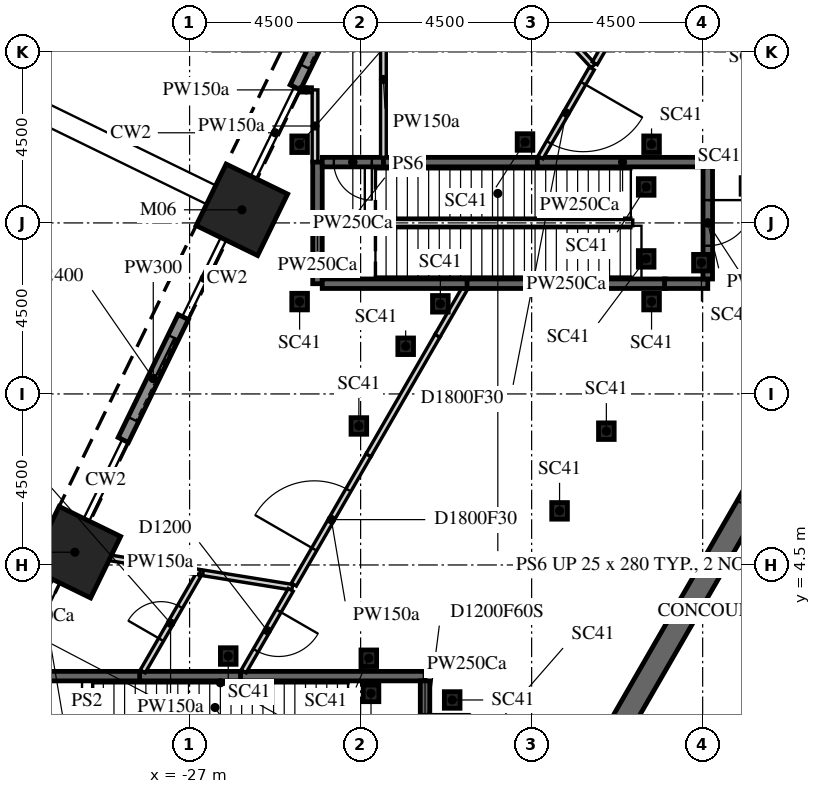
"""IFC4 building model, lengths in metres.
Left out: names, types, materials, properties, quantities, classifications, styles, units other than length and angle.
Written with IfcOpenShell. Run it as: python <this file> out.ifc"""

import sys

from ifc_helpers import new_model, si_unit, direction, frame, frame_2d, origin, origin_2d, place, context, subcontext, project, spatial, polyline, rectangle, i_section, outline, extrude, element, fill, save


model = new_model("IFC4")
c1 = context("Model", 3, precision=1e-05, world=origin(), true_north=direction((0.0, 1.0)))
c2 = subcontext(c1, "Body", "Model", "MODEL_VIEW")
j1 = project(units=[si_unit("LENGTHUNIT", "METRE"), si_unit("PLANEANGLEUNIT", "RADIAN")], contexts=[c1])
p1 = place(None, origin())
s1 = spatial("IfcSite", under=j1, at=p1, CompositionType="ELEMENT")
p2 = place(p1, origin())
s2 = spatial("IfcBuilding", under=s1, at=p2, CompositionType="ELEMENT")
p3 = place(p2, origin())
s3 = spatial("IfcBuildingStorey", under=s2, at=p3, CompositionType="ELEMENT", Elevation=0.0)
for number, where, z_axis, x_axis in (
    (1, (-25.624, 13.845, -2.1), (0.0, 0.0, 1.0), (0.438, 0.899, 0.0)),
    (2, (-30.018, 4.836, -2.1), (0.0, 0.0, 1.0), (0.438, 0.899, 0.0)),
):
    element("IfcColumn", number, at=place(p3, frame(where, z_axis=z_axis, x_axis=x_axis)), inside=s3, PredefinedType="COLUMN", context=c2, shape_type="SweptSolid", body=[
        extrude(rectangle(XDim=1.8, YDim=1.8, at=origin_2d()), origin(), (0.0, 0.0, 1.0), 10.85),
    ])
for number, where, z_axis, x_axis in (
    (3, (-25.983, 2.104, -2.1), (0.0, 0.0, 1.0), (1.0, 0.0, 0.0)),
    (4, (-22.546, 8.157, -2.1), (0.0, 0.0, 1.0), (1.0, 0.0, 0.0)),
    (5, (-17.265, 5.924, -2.1), (0.0, 0.0, 1.0), (1.0, 0.0, 0.0)),
    (6, (-20.091, 0.948, -2.1), (0.0, 0.0, 1.0), (1.0, 0.0, 0.0)),
    (7, (-22.226, 1.121, -2.1), (0.0, 0.0, 1.0), (1.0, 0.0, 0.0)),
    (8, (-16.034, 8.021, -2.1), (0.0, 0.0, 1.0), (1.0, 0.0, 0.0)),
    (9, (-21.314, 10.254, -2.1), (0.0, 0.0, 1.0), (1.0, 0.0, 0.0)),
    (10, (-20.402, 11.371, -2.1), (0.0, 0.0, 1.0), (1.0, 0.0, 0.0)),
    (11, (-24.105, 11.43, -2.1), (0.0, 0.0, 1.0), (1.0, 0.0, 0.0)),
    (12, (-24.105, 15.57, -2.1), (0.0, 0.0, 1.0), (1.0, 0.0, 0.0)),
    (13, (-18.174, 15.629, -2.1), (0.0, 0.0, 1.0), (1.0, 0.0, 0.0)),
    (14, (-14.986, 14.446, -2.1), (0.0, 0.0, 1.0), (1.0, 0.0, 0.0)),
    (15, (-14.986, 12.554, -2.1), (0.0, 0.0, 1.0), (1.0, 0.0, 0.0)),
    (16, (-13.532, 12.454, -2.1), (0.0, 0.0, 1.0), (1.0, 0.0, 0.0)),
    (17, (-22.285, 2.045, -2.1), (0.0, 0.0, 1.0), (1.0, 0.0, 0.0)),
    (18, (-14.845, 15.57, -2.1), (0.0, 0.0, 1.0), (1.0, 0.0, 0.0)),
    (19, (-14.845, 11.43, -2.1), (0.0, 0.0, 1.0), (1.0, 0.0, 0.0)),
):
    element("IfcColumn", number, at=place(p3, frame(where, z_axis=z_axis, x_axis=x_axis)), inside=s3, PredefinedType="COLUMN", context=c2, shape_type="SweptSolid", body=[
        extrude(i_section(OverallWidth=0.412, OverallDepth=0.437, WebThickness=0.036, FlangeThickness=0.058, FilletRadius=0.015, at=origin_2d()), origin(), (0.0, 0.0, 1.0), 10.85),
    ])
p4 = place(p3, frame((-22.904, 19.764, 0.0), z_axis=(0.0, 0.0, 1.0), x_axis=(-0.43833704405, -0.898810678516, 0.0)))
e20 = element("IfcWall", 20, at=p4, inside=s3, PredefinedType="SOLIDWALL", context=c2, shape_type="SweptSolid", body=[
    extrude(rectangle(XDim=3.0, YDim=0.3, at=frame_2d((1.5, 0.0))), origin(), (0.0, 0.0, 1.0), 7.823),
])
p5 = place(p4, frame((0.6, 0.0, 0.0)))
e21 = element("IfcOpeningElement", 21, at=p5, cuts=e20, PredefinedType="OPENING", context=c2, shape_type="SweptSolid", body=[
    extrude(rectangle(XDim=1.8, YDim=2.4, at=frame_2d((0.9, 1.2))), frame((0.0, 0.16, 0.0), z_axis=(0.0, -1.0, 0.0), x_axis=(1.0, 0.0, 0.0)), (0.0, 0.0, 1.0), 0.32),
])
p6 = place(p3, frame((-27.167, 11.024, 0.0), z_axis=(0.0, 0.0, 1.0), x_axis=(-0.438348810402, -0.89880494014, 0.0)))
e22 = element("IfcWall", 22, at=p6, inside=s3, PredefinedType="SOLIDWALL", context=c2, shape_type="SweptSolid", body=[
    extrude(rectangle(XDim=3.6, YDim=0.3, at=frame_2d((1.8, 0.0))), origin(), (0.0, 0.0, 1.0), 7.823),
])
p7 = place(p6, frame((0.6, 0.0, 0.0)))
e23 = element("IfcOpeningElement", 23, at=p7, cuts=e22, PredefinedType="OPENING", context=c2, shape_type="SweptSolid", body=[
    extrude(rectangle(XDim=2.4, YDim=3.0, at=frame_2d((1.2, 1.5))), frame((0.0, 0.16, 0.0), z_axis=(0.0, -1.0, 0.0), x_axis=(1.0, 0.0, 0.0)), (0.0, 0.0, 1.0), 0.32),
])
p8 = place(p3, frame((-7.91, 13.7, -2.1), z_axis=(0.0, 0.0, 1.0), x_axis=(-0.499999880136, -0.866025472988, 0.0)))
e24 = element("IfcWall", 24, at=p8, inside=s3, PredefinedType="SHEAR", context=c2, shape_type="SweptSolid", body=[
    extrude(outline(polyline([(-0.173, -0.3), (15.993, -0.3), (15.646, 0.3), (0.173, 0.3), (-0.173, -0.3)])), origin(), (0.0, 0.0, 1.0), 10.85),
])
p9 = place(p8, frame((7.039, 0.0, 2.1)))
e25 = element("IfcOpeningElement", 25, at=p9, cuts=e24, PredefinedType="OPENING", context=c2, shape_type="SweptSolid", body=[
    extrude(rectangle(XDim=1.8, YDim=2.4, at=frame_2d((0.9, 1.2))), frame((0.0, 0.31, 0.0), z_axis=(0.0, -1.0, 0.0), x_axis=(1.0, 0.0, 0.0)), (0.0, 0.0, 1.0), 0.62),
])
p10 = place(p3, frame((-30.95, 1.575, 0.0), z_axis=(0.0, 0.0, 1.0), x_axis=(1.0, 0.0, 0.0)))
e26 = element("IfcWall", 26, at=p10, inside=s3, PredefinedType="PARTITIONING", context=c2, shape_type="SweptSolid", body=[
    extrude(rectangle(XDim=2.657, YDim=0.25, at=frame_2d((1.329, 0.0))), origin(), (0.0, 0.0, 1.0), 8.75),
])
p11 = place(p3, frame((-30.018, 4.836, 0.0), z_axis=(0.0, 0.0, 1.0), x_axis=(0.987270453079, -0.159050471478, 0.0)))
e27 = element("IfcWall", 27, at=p11, inside=s3, PredefinedType="PARTITIONING", context=c2, shape_type="SweptSolid", body=[
    extrude(rectangle(XDim=3.333, YDim=0.15, at=frame_2d((1.666, 0.0))), origin(), (0.0, 0.0, 1.0), 8.75),
])
p12 = place(p3, frame((-28.315, 1.575, 0.0), z_axis=(0.0, 0.0, 1.0), x_axis=(1.0, 0.0, 0.0)))
e28 = element("IfcWall", 28, at=p12, inside=s3, PredefinedType="PARTITIONING", context=c2, shape_type="SweptSolid", body=[
    extrude(rectangle(XDim=2.678, YDim=0.25, at=frame_2d((1.339, 0.0))), origin(), (0.0, 0.0, 1.0), 8.75),
])
p13 = place(p3, frame((-28.233, 1.7, 0.0), z_axis=(0.0, 0.0, 1.0), x_axis=(0.500083180475, 0.865977374189, 0.0)))
e29 = element("IfcWall", 29, at=p13, inside=s3, PredefinedType="PARTITIONING", context=c2, shape_type="SweptSolid", body=[
    extrude(rectangle(XDim=2.929, YDim=0.15, at=frame_2d((1.465, 0.0))), origin(), (0.0, 0.0, 1.0), 8.75),
])
p14 = place(p13, frame((0.965, 0.0, 0.0)))
e30 = element("IfcOpeningElement", 30, at=p14, cuts=e29, PredefinedType="OPENING", context=c2, shape_type="SweptSolid", body=[
    extrude(rectangle(XDim=1.0, YDim=2.1, at=frame_2d((0.5, 1.05))), frame((0.0, 0.085, 0.0), z_axis=(0.0, -1.0, 0.0), x_axis=(1.0, 0.0, 0.0)), (0.0, 0.0, 1.0), 0.17),
])
p15 = place(p3, frame((-26.649, 4.293, 0.0), z_axis=(0.0, 0.0, 1.0), x_axis=(0.987239560751, -0.159242110287, 0.0)))
e31 = element("IfcWall", 31, at=p15, inside=s3, PredefinedType="PARTITIONING", context=c2, shape_type="SweptSolid", body=[
    extrude(rectangle(XDim=2.381, YDim=0.15, at=frame_2d((1.19, 0.0))), origin(), (0.0, 0.0, 1.0), 8.75),
])
p16 = place(p3, frame((-25.659, 1.575, 0.0), z_axis=(0.0, 0.0, 1.0), x_axis=(1.0, 0.0, 0.0)))
e32 = element("IfcWall", 32, at=p16, inside=s3, PredefinedType="PARTITIONING", context=c2, shape_type="SweptSolid", body=[
    extrude(rectangle(XDim=4.854, YDim=0.25, at=frame_2d((2.427, 0.0))), origin(), (0.0, 0.0, 1.0), 8.75),
])
p17 = place(p3, frame((-24.338, 3.844, 0.0), z_axis=(0.0, 0.0, 1.0), x_axis=(-0.500188907164, -0.865916310708, 0.0)))
e33 = element("IfcWall", 33, at=p17, inside=s3, PredefinedType="PARTITIONING", context=c2, shape_type="SweptSolid", body=[
    extrude(rectangle(XDim=2.477, YDim=0.15, at=frame_2d((1.238, 0.0))), origin(), (0.0, 0.0, 1.0), 8.75),
])
p18 = place(p17, frame((0.638, 0.0, 0.0)))
e34 = element("IfcOpeningElement", 34, at=p18, cuts=e33, PredefinedType="OPENING", context=c2, shape_type="SweptSolid", body=[
    extrude(rectangle(XDim=1.2, YDim=2.1, at=frame_2d((0.6, 1.05))), frame((0.0, 0.085, 0.0), z_axis=(0.0, -1.0, 0.0), x_axis=(1.0, 0.0, 0.0)), (0.0, 0.0, 1.0), 0.17),
])
p19 = place(p3, frame((-23.7, 15.1, 0.0), z_axis=(0.0, 0.0, 1.0), x_axis=(0.0, 1.0, 0.0)))
e35 = element("IfcWall", 35, at=p19, inside=s3, PredefinedType="PARTITIONING", context=c2, shape_type="SweptSolid", body=[
    extrude(rectangle(XDim=1.9, YDim=0.15, at=frame_2d((0.95, 0.0))), origin(), (0.0, 0.0, 1.0), 8.75),
])
p20 = place(p3, frame((-23.775, 17.0, 0.0), z_axis=(0.0, 0.0, 1.0), x_axis=(-1.0, 0.0, 0.0)))
e36 = element("IfcWall", 36, at=p20, inside=s3, PredefinedType="PARTITIONING", context=c2, shape_type="SweptSolid", body=[
    extrude(rectangle(XDim=0.31, YDim=0.15, at=frame_2d((0.155, 0.0))), origin(), (0.0, 0.0, 1.0), 8.75),
])
p21 = place(p3, frame((-23.635, 11.9, 0.0), z_axis=(0.0, 0.0, 1.0), x_axis=(0.0, 1.0, 0.0)))
e37 = element("IfcWall", 37, at=p21, inside=s3, PredefinedType="PARTITIONING", context=c2, shape_type="SweptSolid", body=[
    extrude(rectangle(XDim=3.2, YDim=0.25, at=frame_2d((1.6, 0.0))), origin(), (0.0, 0.0, 1.0), 8.75),
])
p22 = place(p3, frame((-24.258, 3.983, 0.0), z_axis=(0.0, 0.0, 1.0), x_axis=(0.500095273167, 0.865970390808, 0.0)))
e38 = element("IfcWall", 38, at=p22, inside=s3, PredefinedType="PARTITIONING", context=c2, shape_type="SweptSolid", body=[
    extrude(rectangle(XDim=3.949, YDim=0.15, at=frame_2d((1.975, 0.0))), origin(), (0.0, 0.0, 1.0), 8.75),
])
p23 = place(p22, frame((1.074, 0.0, 0.0)))
e39 = element("IfcOpeningElement", 39, at=p23, cuts=e38, PredefinedType="OPENING", context=c2, shape_type="SweptSolid", body=[
    extrude(rectangle(XDim=1.8, YDim=2.1, at=frame_2d((0.9, 1.05))), frame((0.0, 0.085, 0.0), z_axis=(0.0, -1.0, 0.0), x_axis=(1.0, 0.0, 0.0)), (0.0, 0.0, 1.0), 0.17),
])
p24 = place(p3, frame((-21.91, 15.1, 0.0), z_axis=(0.0, 0.0, 1.0), x_axis=(1.0, 0.0, 0.0)))
e40 = element("IfcWall", 40, at=p24, inside=s3, PredefinedType="PARTITIONING", context=c2, shape_type="SweptSolid", body=[
    extrude(rectangle(XDim=4.082, YDim=0.25, at=frame_2d((2.041, 0.0))), origin(), (0.0, 0.0, 1.0), 8.75),
])
p25 = place(p3, frame((-21.9, 15.1, 0.0), z_axis=(0.0, 0.0, 1.0), x_axis=(-1.0, 0.0, 0.0)))
e41 = element("IfcWall", 41, at=p25, inside=s3, PredefinedType="PARTITIONING", context=c2, shape_type="SweptSolid", body=[
    extrude(rectangle(XDim=1.61, YDim=0.25, at=frame_2d((0.805, 0.0))), origin(), (0.0, 0.0, 1.0), 8.75),
])
p26 = place(p25, frame((0.305, 0.0, 0.0)))
e42 = element("IfcOpeningElement", 42, at=p26, cuts=e41, PredefinedType="OPENING", context=c2, shape_type="SweptSolid", body=[
    extrude(rectangle(XDim=1.0, YDim=2.1, at=frame_2d((0.5, 1.05))), frame((0.0, 0.135, 0.0), z_axis=(0.0, -1.0, 0.0), x_axis=(1.0, 0.0, 0.0)), (0.0, 0.0, 1.0), 0.27),
])
p27 = place(p3, frame((-21.9, 19.325, 0.0), z_axis=(0.0, 0.0, 1.0), x_axis=(0.0, -1.0, 0.0)))
e43 = element("IfcWall", 43, at=p27, inside=s3, PredefinedType="PARTITIONING", context=c2, shape_type="SweptSolid", body=[
    extrude(rectangle(XDim=4.1, YDim=0.15, at=frame_2d((2.05, 0.0))), origin(), (0.0, 0.0, 1.0), 8.75),
])
p28 = place(p3, frame((-21.23, 22.854, 0.0), z_axis=(0.0, 0.0, 1.0), x_axis=(0.68068621698, -0.732575097866, 0.0)))
e44 = element("IfcWall", 44, at=p28, inside=s3, PredefinedType="PARTITIONING", context=c2, shape_type="SweptSolid", body=[
    extrude(rectangle(XDim=7.128, YDim=0.15, at=frame_2d((3.564, 0.0))), origin(), (0.0, 0.0, 1.0), 8.75),
])
p29 = place(p3, frame((-20.805, 1.45, 0.0), z_axis=(0.0, 0.0, 1.0), x_axis=(0.0, -1.0, 0.0)))
e45 = element("IfcWall", 45, at=p29, inside=s3, PredefinedType="PARTITIONING", context=c2, shape_type="SweptSolid", body=[
    extrude(rectangle(XDim=2.95, YDim=0.25, at=frame_2d((1.475, 0.0))), origin(), (0.0, 0.0, 1.0), 8.75),
])
p30 = place(p29, frame((0.875, 0.0, 0.0)))
e46 = element("IfcOpeningElement", 46, at=p30, cuts=e45, PredefinedType="OPENING", context=c2, shape_type="SweptSolid", body=[
    extrude(rectangle(XDim=1.2, YDim=2.1, at=frame_2d((0.6, 1.05))), frame((0.0, 0.135, 0.0), z_axis=(0.0, -1.0, 0.0), x_axis=(1.0, 0.0, 0.0)), (0.0, 0.0, 1.0), 0.27),
])
p31 = place(p3, frame((-20.469, 10.546, 0.0), z_axis=(0.0, 0.0, 1.0), x_axis=(-0.499917465472, -0.866073049873, 0.0)))
e47 = element("IfcWall", 47, at=p31, inside=s3, PredefinedType="PARTITIONING", context=c2, shape_type="SweptSolid", body=[
    extrude(rectangle(XDim=3.648, YDim=0.15, at=frame_2d((1.824, 0.0))), origin(), (0.0, 0.0, 1.0), 8.75),
])
p32 = place(p3, frame((-19.759, 11.775, 0.0), z_axis=(0.0, 0.0, 1.0), x_axis=(-0.499932865626, -0.866064160364, 0.0)))
e48 = element("IfcWall", 48, at=p32, inside=s3, PredefinedType="PARTITIONING", context=c2, shape_type="SweptSolid", body=[
    extrude(rectangle(XDim=1.44, YDim=0.15, at=frame_2d((0.72, 0.0))), origin(), (0.0, 0.0, 1.0), 8.75),
])
p33 = place(p3, frame((-19.677, 11.9, 0.0), z_axis=(0.0, 0.0, 1.0), x_axis=(-1.0, 0.0, 0.0)))
e49 = element("IfcWall", 49, at=p33, inside=s3, PredefinedType="PARTITIONING", context=c2, shape_type="SweptSolid", body=[
    extrude(rectangle(XDim=3.833, YDim=0.25, at=frame_2d((1.917, 0.0))), origin(), (0.0, 0.0, 1.0), 8.75),
])
p34 = place(p3, frame((-17.85, 15.1, 0.0), z_axis=(0.0, 0.0, 1.0), x_axis=(1.0, 0.0, 0.0)))
e50 = element("IfcWall", 50, at=p34, inside=s3, PredefinedType="PARTITIONING", context=c2, shape_type="SweptSolid", body=[
    extrude(rectangle(XDim=4.485, YDim=0.25, at=frame_2d((2.243, 0.0))), origin(), (0.0, 0.0, 1.0), 8.75),
])
p35 = place(p3, frame((-16.417, 17.564, 0.0), z_axis=(0.0, 0.0, 1.0), x_axis=(-0.500066738792, -0.865986868696, 0.0)))
e51 = element("IfcWall", 51, at=p35, inside=s3, PredefinedType="PARTITIONING", context=c2, shape_type="SweptSolid", body=[
    extrude(rectangle(XDim=2.701, YDim=0.15, at=frame_2d((1.351, 0.0))), origin(), (0.0, 0.0, 1.0), 8.75),
])
p36 = place(p35, frame((0.45, 0.0, 0.0)))
e52 = element("IfcOpeningElement", 52, at=p36, cuts=e51, PredefinedType="OPENING", context=c2, shape_type="SweptSolid", body=[
    extrude(rectangle(XDim=1.8, YDim=2.1, at=frame_2d((0.9, 1.05))), frame((0.0, 0.085, 0.0), z_axis=(0.0, -1.0, 0.0), x_axis=(1.0, 0.0, 0.0)), (0.0, 0.0, 1.0), 0.17),
])
p37 = place(p3, frame((-16.339, 17.7, 0.0), z_axis=(0.0, 0.0, 1.0), x_axis=(0.500370112486, 0.865811613765, 0.0)))
e53 = element("IfcWall", 53, at=p37, inside=s3, PredefinedType="PARTITIONING", context=c2, shape_type="SweptSolid", body=[
    extrude(rectangle(XDim=2.066, YDim=0.15, at=frame_2d((1.033, 0.0))), origin(), (0.0, 0.0, 1.0), 8.75),
])
p38 = place(p37, frame((0.533, 0.0, 0.0)))
e54 = element("IfcOpeningElement", 54, at=p38, cuts=e53, PredefinedType="OPENING", context=c2, shape_type="SweptSolid", body=[
    extrude(rectangle(XDim=1.0, YDim=2.1, at=frame_2d((0.5, 1.05))), frame((0.0, 0.085, 0.0), z_axis=(0.0, -1.0, 0.0), x_axis=(1.0, 0.0, 0.0)), (0.0, 0.0, 1.0), 0.17),
])
p39 = place(p3, frame((-14.481, 11.9, 0.0), z_axis=(0.0, 0.0, 1.0), x_axis=(-1.0, 0.0, 0.0)))
e55 = element("IfcWall", 55, at=p39, inside=s3, PredefinedType="PARTITIONING", context=c2, shape_type="SweptSolid", body=[
    extrude(rectangle(XDim=5.219, YDim=0.25, at=frame_2d((2.609, 0.0))), origin(), (0.0, 0.0, 1.0), 8.75),
])
p40 = place(p3, frame((-13.365, 11.9, 0.0), z_axis=(0.0, 0.0, 1.0), x_axis=(-1.0, 0.0, 0.0)))
e56 = element("IfcWall", 56, at=p40, inside=s3, PredefinedType="PARTITIONING", context=c2, shape_type="SweptSolid", body=[
    extrude(rectangle(XDim=1.138, YDim=0.25, at=frame_2d((0.569, 0.0))), origin(), (0.0, 0.0, 1.0), 8.75),
])
p41 = place(p3, frame((-13.365, 14.975, 0.0), z_axis=(0.0, 0.0, 1.0), x_axis=(0.0, -1.0, 0.0)))
e57 = element("IfcWall", 57, at=p41, inside=s3, PredefinedType="PARTITIONING", context=c2, shape_type="SweptSolid", body=[
    extrude(rectangle(XDim=2.95, YDim=0.25, at=frame_2d((1.475, 0.0))), origin(), (0.0, 0.0, 1.0), 8.297),
])
p42 = place(p41, frame((0.875, 0.0, 0.0)))
e58 = element("IfcOpeningElement", 58, at=p42, cuts=e57, PredefinedType="OPENING", context=c2, shape_type="SweptSolid", body=[
    extrude(rectangle(XDim=1.2, YDim=2.1, at=frame_2d((0.6, 1.05))), frame((0.0, 0.135, 0.0), z_axis=(0.0, -1.0, 0.0), x_axis=(1.0, 0.0, 0.0)), (0.0, 0.0, 1.0), 0.27),
])
p43 = place(p5, frame((0.0, -0.025, 0.0)))
e59 = element("IfcDoor", 59, at=p43, inside=s3, OperationType="DOUBLE_DOOR_SLIDING", PredefinedType="DOOR", context=c2, shape_type="SweptSolid", body=[
    extrude(rectangle(XDim=1.8, YDim=2.4, at=frame_2d((0.9, 1.2))), frame((0.0, 0.025, 0.0), z_axis=(0.0, -1.0, 0.0), x_axis=(1.0, 0.0, 0.0)), (0.0, 0.0, 1.0), 0.05),
])
fill(e21, e59)
p44 = place(p7, frame((0.0, -0.025, 0.0)))
e60 = element("IfcDoor", 60, at=p44, inside=s3, OperationType="DOUBLE_DOOR_SLIDING", PredefinedType="DOOR", context=c2, shape_type="SweptSolid", body=[
    extrude(rectangle(XDim=2.4, YDim=3.0, at=frame_2d((1.2, 1.5))), frame((0.0, 0.025, 0.0), z_axis=(0.0, -1.0, 0.0), x_axis=(1.0, 0.0, 0.0)), (0.0, 0.0, 1.0), 0.05),
])
fill(e23, e60)
p45 = place(p14, origin())
e61 = element("IfcDoor", 61, at=p45, inside=s3, OperationType="SINGLE_SWING_RIGHT", PredefinedType="DOOR", context=c2, shape_type="SweptSolid", body=[
    extrude(rectangle(XDim=1.0, YDim=2.1, at=frame_2d((0.5, 1.05))), frame((0.0, 0.025, 0.0), z_axis=(0.0, -1.0, 0.0), x_axis=(1.0, 0.0, 0.0)), (0.0, 0.0, 1.0), 0.05),
])
fill(e30, e61)
p46 = place(p18, origin())
e62 = element("IfcDoor", 62, at=p46, inside=s3, OperationType="SINGLE_SWING_RIGHT", PredefinedType="DOOR", context=c2, shape_type="SweptSolid", body=[
    extrude(rectangle(XDim=1.2, YDim=2.1, at=frame_2d((0.6, 1.05))), frame((0.0, 0.025, 0.0), z_axis=(0.0, -1.0, 0.0), x_axis=(1.0, 0.0, 0.0)), (0.0, 0.0, 1.0), 0.05),
])
fill(e34, e62)
p47 = place(p23, origin())
e63 = element("IfcDoor", 63, at=p47, inside=s3, OperationType="DOUBLE_DOOR_SINGLE_SWING", PredefinedType="DOOR", context=c2, shape_type="SweptSolid", body=[
    extrude(rectangle(XDim=1.8, YDim=2.1, at=frame_2d((0.9, 1.05))), frame((0.0, 0.025, 0.0), z_axis=(0.0, -1.0, 0.0), x_axis=(1.0, 0.0, 0.0)), (0.0, 0.0, 1.0), 0.05),
])
fill(e39, e63)
p48 = place(p26, origin())
e64 = element("IfcDoor", 64, at=p48, inside=s3, OperationType="SINGLE_SWING_RIGHT", PredefinedType="DOOR", context=c2, shape_type="SweptSolid", body=[
    extrude(rectangle(XDim=1.0, YDim=2.1, at=frame_2d((0.5, 1.05))), frame((0.0, 0.025, 0.0), z_axis=(0.0, -1.0, 0.0), x_axis=(1.0, 0.0, 0.0)), (0.0, 0.0, 1.0), 0.05),
])
fill(e42, e64)
p49 = place(p36, origin())
e65 = element("IfcDoor", 65, at=p49, inside=s3, OperationType="DOUBLE_DOOR_SINGLE_SWING", PredefinedType="DOOR", context=c2, shape_type="SweptSolid", body=[
    extrude(rectangle(XDim=1.8, YDim=2.1, at=frame_2d((0.9, 1.05))), frame((0.0, 0.025, 0.0), z_axis=(0.0, -1.0, 0.0), x_axis=(1.0, 0.0, 0.0)), (0.0, 0.0, 1.0), 0.05),
])
fill(e52, e65)
p50 = place(p42, origin())
e66 = element("IfcDoor", 66, at=p50, inside=s3, OperationType="SINGLE_SWING_LEFT", PredefinedType="DOOR", context=c2, shape_type="SweptSolid", body=[
    extrude(rectangle(XDim=1.2, YDim=2.1, at=frame_2d((0.6, 1.05))), frame((0.0, 0.025, 0.0), z_axis=(0.0, -1.0, 0.0), x_axis=(1.0, 0.0, 0.0)), (0.0, 0.0, 1.0), 0.05),
])
fill(e58, e66)
save(model, sys.argv[1])
